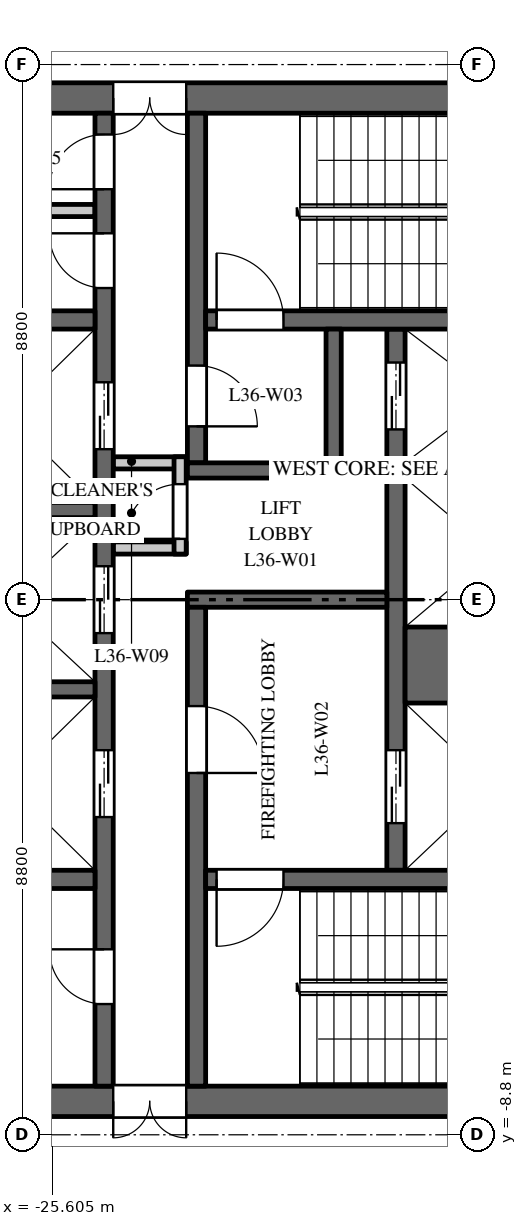
"""IFC4 building model, lengths in metres.
Left out: names, types, materials, properties, quantities, classifications, styles, units other than length and angle.
Written with IfcOpenShell. Run it as: python <this file> out.ifc"""

import sys

from ifc_helpers import new_model, si_unit, direction, frame, frame_2d, origin, place, context, subcontext, project, spatial, rectangle, extrude, element, fill, save


model = new_model("IFC4")
c1 = context("Model", 3, precision=1e-05, world=origin(), true_north=direction((0.0, 1.0)))
c2 = subcontext(c1, "Body", "Model", "MODEL_VIEW")
j1 = project(units=[si_unit("LENGTHUNIT", "METRE"), si_unit("PLANEANGLEUNIT", "RADIAN")], contexts=[c1])
p1 = place(None, origin())
s1 = spatial("IfcSite", under=j1, at=p1, CompositionType="ELEMENT")
p2 = place(p1, origin())
s2 = spatial("IfcBuilding", under=s1, at=p2, CompositionType="ELEMENT")
p3 = place(p2, frame((0.0, 0.0, 158.0)))
s3 = spatial("IfcBuildingStorey", under=s2, at=p3, CompositionType="ELEMENT", Elevation=158.0)
p4 = place(p3, frame((-16.5, 8.25, 0.0), z_axis=(0.0, 0.0, 1.0), x_axis=(-1.0, 0.0, 0.0)))
e1 = element("IfcWall", 1, at=p4, inside=s3, PredefinedType="SHEAR", context=c2, shape_type="SweptSolid", body=[
    extrude(rectangle(XDim=15.0, YDim=0.5, at=frame_2d((7.5, 0.0))), origin(), (0.0, 0.0, 1.0), 3.7),
])
p5 = place(p4, frame((6.9, 0.0, 0.0)))
e2 = element("IfcOpeningElement", 2, at=p5, cuts=e1, PredefinedType="OPENING", context=c2, shape_type="SweptSolid", body=[
    extrude(rectangle(XDim=1.2, YDim=2.1, at=frame_2d((0.6, 1.05))), frame((0.0, 0.26, 0.0), z_axis=(0.0, -1.0, 0.0), x_axis=(1.0, 0.0, 0.0)), (0.0, 0.0, 1.0), 0.52),
])
p6 = place(p4, frame((12.275, 0.0, 0.0)))
e3 = element("IfcOpeningElement", 3, at=p6, cuts=e1, PredefinedType="OPENING", context=c2, shape_type="SweptSolid", body=[
    extrude(rectangle(XDim=0.9, YDim=2.1, at=frame_2d((0.45, 1.05))), frame((0.0, 0.26, 0.0), z_axis=(0.0, -1.0, 0.0), x_axis=(1.0, 0.0, 0.0)), (0.0, 0.0, 1.0), 0.52),
])
p7 = place(p3, frame((-16.5, -8.25, 0.0), z_axis=(0.0, 0.0, 1.0), x_axis=(-1.0, 0.0, 0.0)))
e4 = element("IfcWall", 4, at=p7, inside=s3, PredefinedType="SHEAR", context=c2, shape_type="SweptSolid", body=[
    extrude(rectangle(XDim=15.0, YDim=0.5, at=frame_2d((7.5, 0.0))), origin(), (0.0, 0.0, 1.0), 3.7),
])
p8 = place(p7, frame((6.9, 0.0, 0.0)))
e5 = element("IfcOpeningElement", 5, at=p8, cuts=e4, PredefinedType="OPENING", context=c2, shape_type="SweptSolid", body=[
    extrude(rectangle(XDim=1.2, YDim=2.1, at=frame_2d((0.6, 1.05))), frame((0.0, 0.26, 0.0), z_axis=(0.0, -1.0, 0.0), x_axis=(1.0, 0.0, 0.0)), (0.0, 0.0, 1.0), 0.52),
])
p9 = place(p7, frame((12.425, 0.0, 0.0)))
e6 = element("IfcOpeningElement", 6, at=p9, cuts=e4, PredefinedType="OPENING", context=c2, shape_type="SweptSolid", body=[
    extrude(rectangle(XDim=0.9, YDim=2.1, at=frame_2d((0.45, 1.05))), frame((0.0, 0.26, 0.0), z_axis=(0.0, -1.0, 0.0), x_axis=(1.0, 0.0, 0.0)), (0.0, 0.0, 1.0), 0.52),
])
p10 = place(p3, frame((-19.95, -4.45, 0.0), z_axis=(0.0, 0.0, 1.0), x_axis=(0.0, 1.0, 0.0)))
e7 = element("IfcWall", 7, at=p10, inside=s3, PredefinedType="SHEAR", context=c2, shape_type="SweptSolid", body=[
    extrude(rectangle(XDim=8.9, YDim=0.3, at=frame_2d((4.45, 0.0))), origin(), (0.0, 0.0, 1.0), 3.7),
])
p11 = place(p10, frame((0.775, 0.0, 0.0)))
e8 = element("IfcOpeningElement", 8, at=p11, cuts=e7, PredefinedType="OPENING", context=c2, shape_type="SweptSolid", body=[
    extrude(rectangle(XDim=1.2, YDim=2.1, at=frame_2d((0.6, 1.05))), frame((0.0, 0.16, 0.0), z_axis=(0.0, -1.0, 0.0), x_axis=(1.0, 0.0, 0.0)), (0.0, 0.0, 1.0), 0.32),
])
p12 = place(p10, frame((7.25, 0.0, 0.0)))
e9 = element("IfcOpeningElement", 9, at=p12, cuts=e7, PredefinedType="OPENING", context=c2, shape_type="SweptSolid", body=[
    extrude(rectangle(XDim=1.1, YDim=2.1, at=frame_2d((0.55, 1.05))), frame((0.0, 0.16, 0.0), z_axis=(0.0, -1.0, 0.0), x_axis=(1.0, 0.0, 0.0)), (0.0, 0.0, 1.0), 0.32),
])
p13 = place(p3, frame((-24.75, -8.0, 0.0), z_axis=(0.0, 0.0, 1.0), x_axis=(0.0, 1.0, 0.0)))
e10 = element("IfcWall", 10, at=p13, inside=s3, PredefinedType="SHEAR", context=c2, shape_type="SweptSolid", body=[
    extrude(rectangle(XDim=16.0, YDim=0.3, at=frame_2d((8.0, 0.0))), origin(), (0.0, 0.0, 1.0), 3.7),
])
p14 = place(p13, frame((4.425, 0.0, 0.0)))
e11 = element("IfcOpeningElement", 11, at=p14, cuts=e10, PredefinedType="OPENING", context=c2, shape_type="SweptSolid", body=[
    extrude(rectangle(XDim=1.1, YDim=2.1, at=frame_2d((0.55, 1.05))), frame((0.0, 0.16, 0.0), z_axis=(0.0, -1.0, 0.0), x_axis=(1.0, 0.0, 0.0)), (0.0, 0.0, 1.0), 0.32),
])
p15 = place(p13, frame((7.45, 0.0, 0.0)))
e12 = element("IfcOpeningElement", 12, at=p15, cuts=e10, PredefinedType="OPENING", context=c2, shape_type="SweptSolid", body=[
    extrude(rectangle(XDim=1.1, YDim=2.1, at=frame_2d((0.55, 1.05))), frame((0.0, 0.16, 0.0), z_axis=(0.0, -1.0, 0.0), x_axis=(1.0, 0.0, 0.0)), (0.0, 0.0, 1.0), 0.32),
])
p16 = place(p13, frame((10.475, 0.0, 0.0)))
e13 = element("IfcOpeningElement", 13, at=p16, cuts=e10, PredefinedType="OPENING", context=c2, shape_type="SweptSolid", body=[
    extrude(rectangle(XDim=1.1, YDim=2.1, at=frame_2d((0.55, 1.05))), frame((0.0, 0.16, 0.0), z_axis=(0.0, -1.0, 0.0), x_axis=(1.0, 0.0, 0.0)), (0.0, 0.0, 1.0), 0.32),
])
p17 = place(p13, frame((13.125, 0.0, 0.0)))
e14 = element("IfcOpeningElement", 14, at=p17, cuts=e10, PredefinedType="OPENING", context=c2, shape_type="SweptSolid", body=[
    extrude(rectangle(XDim=0.9, YDim=2.1, at=frame_2d((0.45, 1.05))), frame((0.0, 0.16, 0.0), z_axis=(0.0, -1.0, 0.0), x_axis=(1.0, 0.0, 0.0)), (0.0, 0.0, 1.0), 0.32),
])
p18 = place(p13, frame((14.75, 0.0, 0.0)))
e15 = element("IfcOpeningElement", 15, at=p18, cuts=e10, PredefinedType="OPENING", context=c2, shape_type="SweptSolid", body=[
    extrude(rectangle(XDim=0.9, YDim=2.1, at=frame_2d((0.45, 1.05))), frame((0.0, 0.16, 0.0), z_axis=(0.0, -1.0, 0.0), x_axis=(1.0, 0.0, 0.0)), (0.0, 0.0, 1.0), 0.32),
])
p19 = place(p13, frame((1.35, 0.0, 0.0)))
e16 = element("IfcOpeningElement", 16, at=p19, cuts=e10, PredefinedType="OPENING", context=c2, shape_type="SweptSolid", body=[
    extrude(rectangle(XDim=0.9, YDim=2.1, at=frame_2d((0.45, 1.05))), frame((0.0, 0.16, 0.0), z_axis=(0.0, -1.0, 0.0), x_axis=(1.0, 0.0, 0.0)), (0.0, 0.0, 1.0), 0.32),
])
p20 = place(p3, frame((-20.1, 0.0, 0.0), z_axis=(0.0, 0.0, 1.0), x_axis=(-1.0, 0.0, 0.0)))
e17 = element("IfcWall", 17, at=p20, inside=s3, PredefinedType="SHEAR", context=c2, shape_type="SweptSolid", body=[
    extrude(rectangle(XDim=3.28, YDim=0.25, at=frame_2d((1.64, 0.0))), origin(), (0.0, 0.0, 1.0), 3.7),
])
for number, where, z_axis, x_axis in (
    (18, (-23.4, 0.85, 0.0), (0.0, 0.0, 1.0), (-1.0, 0.0, 0.0)),
    (19, (-23.4, 2.25, 0.0), (0.0, 0.0, 1.0), (-1.0, 0.0, 0.0)),
):
    element("IfcWall", number, at=place(p3, frame(where, z_axis=z_axis, x_axis=x_axis)), inside=s3, PredefinedType="PARTITIONING", context=c2, shape_type="SweptSolid", body=[
        extrude(rectangle(XDim=1.2, YDim=0.2, at=frame_2d((0.6, 0.0))), origin(), (0.0, 0.0, 1.0), 3.7),
    ])
p21 = place(p3, frame((-23.5, 0.75, 0.0), z_axis=(0.0, 0.0, 1.0), x_axis=(0.0, 1.0, 0.0)))
e20 = element("IfcWall", 20, at=p21, inside=s3, PredefinedType="PARTITIONING", context=c2, shape_type="SweptSolid", body=[
    extrude(rectangle(XDim=1.6, YDim=0.2, at=frame_2d((0.8, 0.0))), origin(), (0.0, 0.0, 1.0), 3.7),
])
p22 = place(p21, frame((0.25, 0.0, 0.0)))
e21 = element("IfcOpeningElement", 21, at=p22, cuts=e20, PredefinedType="OPENING", context=c2, shape_type="SweptSolid", body=[
    extrude(rectangle(XDim=0.9, YDim=2.1, at=frame_2d((0.45, 1.05))), frame((0.0, 0.11, 0.0), z_axis=(0.0, -1.0, 0.0), x_axis=(1.0, 0.0, 0.0)), (0.0, 0.0, 1.0), 0.22),
])
p23 = place(p3, frame((-24.9, 4.6, 0.0), z_axis=(0.0, 0.0, 1.0), x_axis=(-1.0, 0.0, 0.0)))
e22 = element("IfcWall", 22, at=p23, inside=s3, PredefinedType="SHEAR", context=c2, shape_type="SweptSolid", body=[
    extrude(rectangle(XDim=6.1, YDim=0.3, at=frame_2d((3.05, 0.0))), origin(), (0.0, 0.0, 1.0), 3.7),
])
p24 = place(p23, frame((4.2, 0.0, 0.0)))
e23 = element("IfcOpeningElement", 23, at=p24, cuts=e22, PredefinedType="OPENING", context=c2, shape_type="SweptSolid", body=[
    extrude(rectangle(XDim=0.9, YDim=2.1, at=frame_2d((0.45, 1.05))), frame((0.0, 0.16, 0.0), z_axis=(0.0, -1.0, 0.0), x_axis=(1.0, 0.0, 0.0)), (0.0, 0.0, 1.0), 0.32),
])
p25 = place(p3, frame((-24.9, 6.4, 0.0), z_axis=(0.0, 0.0, 1.0), x_axis=(-1.0, 0.0, 0.0)))
e24 = element("IfcWall", 24, at=p25, inside=s3, PredefinedType="PARTITIONING", context=c2, shape_type="SweptSolid", body=[
    extrude(rectangle(XDim=2.35, YDim=0.2, at=frame_2d((1.175, 0.0))), origin(), (0.0, 0.0, 1.0), 3.7),
])
p26 = place(p3, frame((-24.9, -4.6, 0.0), z_axis=(0.0, 0.0, 1.0), x_axis=(-1.0, 0.0, 0.0)))
e25 = element("IfcWall", 25, at=p26, inside=s3, PredefinedType="SHEAR", context=c2, shape_type="SweptSolid", body=[
    extrude(rectangle(XDim=6.1, YDim=0.3, at=frame_2d((3.05, 0.0))), origin(), (0.0, 0.0, 1.0), 3.7),
])
p27 = place(p3, frame((-16.9, -1.075, 0.0), z_axis=(0.0, 0.0, 1.0), x_axis=(-1.0, 0.0, 0.0)))
e26 = element("IfcWall", 26, at=p27, inside=s3, PredefinedType="SHEAR", context=c2, shape_type="SweptSolid", body=[
    extrude(rectangle(XDim=2.9, YDim=1.25, at=frame_2d((1.45, 0.0))), origin(), (0.0, 0.0, 1.0), 3.7),
])
for number, where, z_axis, x_axis in (
    (27, (-16.9, 2.125, 0.0), (0.0, 0.0, 1.0), (-1.0, 0.0, 0.0)),
    (28, (-24.9, -1.475, 0.0), (0.0, 0.0, 1.0), (-1.0, 0.0, 0.0)),
    (29, (-24.9, 1.475, 0.0), (0.0, 0.0, 1.0), (-1.0, 0.0, 0.0)),
):
    element("IfcWall", number, at=place(p3, frame(where, z_axis=z_axis, x_axis=x_axis)), inside=s3, PredefinedType="SHEAR", context=c2, shape_type="SweptSolid", body=[
        extrude(rectangle(XDim=2.9, YDim=0.25, at=frame_2d((1.45, 0.0))), origin(), (0.0, 0.0, 1.0), 3.7),
    ])
p28 = place(p3, frame((-23.23, 2.25, 0.0), z_axis=(0.0, 0.0, 1.0), x_axis=(0.0, 1.0, 0.0)))
e30 = element("IfcWall", 30, at=p28, inside=s3, PredefinedType="SHEAR", context=c2, shape_type="SweptSolid", body=[
    extrude(rectangle(XDim=5.75, YDim=0.3, at=frame_2d((2.875, 0.0))), origin(), (0.0, 0.0, 1.0), 3.7),
])
p29 = place(p28, frame((0.6, 0.0, 0.0)))
e31 = element("IfcOpeningElement", 31, at=p29, cuts=e30, PredefinedType="OPENING", context=c2, shape_type="SweptSolid", body=[
    extrude(rectangle(XDim=1.0, YDim=2.1, at=frame_2d((0.5, 1.05))), frame((0.0, 0.16, 0.0), z_axis=(0.0, -1.0, 0.0), x_axis=(1.0, 0.0, 0.0)), (0.0, 0.0, 1.0), 0.32),
])
p30 = place(p3, frame((-23.23, -8.0, 0.0), z_axis=(0.0, 0.0, 1.0), x_axis=(0.0, 1.0, 0.0)))
e32 = element("IfcWall", 32, at=p30, inside=s3, PredefinedType="SHEAR", context=c2, shape_type="SweptSolid", body=[
    extrude(rectangle(XDim=7.875, YDim=0.3, at=frame_2d((3.938, 0.0))), origin(), (0.0, 0.0, 1.0), 3.7),
])
p31 = place(p30, frame((5.15, 0.0, 0.0)))
e33 = element("IfcOpeningElement", 33, at=p31, cuts=e32, PredefinedType="OPENING", context=c2, shape_type="SweptSolid", body=[
    extrude(rectangle(XDim=1.1, YDim=2.1, at=frame_2d((0.55, 1.05))), frame((0.0, 0.16, 0.0), z_axis=(0.0, -1.0, 0.0), x_axis=(1.0, 0.0, 0.0)), (0.0, 0.0, 1.0), 0.32),
])
p32 = place(p3, frame((-16.9, 4.6, 0.0), z_axis=(0.0, 0.0, 1.0), x_axis=(-1.0, 0.0, 0.0)))
e34 = element("IfcWall", 34, at=p32, inside=s3, PredefinedType="SHEAR", context=c2, shape_type="SweptSolid", body=[
    extrude(rectangle(XDim=6.18, YDim=0.3, at=frame_2d((3.09, 0.0))), origin(), (0.0, 0.0, 1.0), 3.7),
])
p33 = place(p32, frame((4.9, 0.0, 0.0)))
e35 = element("IfcOpeningElement", 35, at=p33, cuts=e34, PredefinedType="OPENING", context=c2, shape_type="SweptSolid", body=[
    extrude(rectangle(XDim=1.1, YDim=2.1, at=frame_2d((0.55, 1.05))), frame((0.0, 0.16, 0.0), z_axis=(0.0, -1.0, 0.0), x_axis=(1.0, 0.0, 0.0)), (0.0, 0.0, 1.0), 0.32),
])
p34 = place(p3, frame((-16.9, -4.6, 0.0), z_axis=(0.0, 0.0, 1.0), x_axis=(-1.0, 0.0, 0.0)))
e36 = element("IfcWall", 36, at=p34, inside=s3, PredefinedType="SHEAR", context=c2, shape_type="SweptSolid", body=[
    extrude(rectangle(XDim=6.18, YDim=0.3, at=frame_2d((3.09, 0.0))), origin(), (0.0, 0.0, 1.0), 3.7),
])
p35 = place(p34, frame((4.9, 0.0, 0.0)))
e37 = element("IfcOpeningElement", 37, at=p35, cuts=e36, PredefinedType="OPENING", context=c2, shape_type="SweptSolid", body=[
    extrude(rectangle(XDim=1.1, YDim=2.1, at=frame_2d((0.55, 1.05))), frame((0.0, 0.16, 0.0), z_axis=(0.0, -1.0, 0.0), x_axis=(1.0, 0.0, 0.0)), (0.0, 0.0, 1.0), 0.32),
])
p36 = place(p3, frame((-20.85, 2.125, 0.0), z_axis=(0.0, 0.0, 1.0), x_axis=(-1.0, 0.0, 0.0)))
e38 = element("IfcWall", 38, at=p36, inside=s3, PredefinedType="SHEAR", context=c2, shape_type="SweptSolid", body=[
    extrude(rectangle(XDim=2.53, YDim=0.25, at=frame_2d((1.265, 0.0))), origin(), (0.0, 0.0, 1.0), 3.7),
])
p37 = place(p3, frame((-20.975, 2.25, 0.0), z_axis=(0.0, 0.0, 1.0), x_axis=(0.0, 1.0, 0.0)))
e39 = element("IfcWall", 39, at=p37, inside=s3, PredefinedType="SHEAR", context=c2, shape_type="SweptSolid", body=[
    extrude(rectangle(XDim=2.2, YDim=0.25, at=frame_2d((1.1, 0.0))), origin(), (0.0, 0.0, 1.0), 3.7),
])
p38 = place(p11, origin())
e40 = element("IfcDoor", 40, at=p38, inside=s3, OperationType="DOUBLE_DOOR_SLIDING", PredefinedType="DOOR", context=c2, shape_type="SweptSolid", body=[
    extrude(rectangle(XDim=1.2, YDim=2.1, at=frame_2d((0.6, 1.05))), frame((0.0, 0.025, 0.0), z_axis=(0.0, -1.0, 0.0), x_axis=(1.0, 0.0, 0.0)), (0.0, 0.0, 1.0), 0.05),
])
fill(e8, e40)
p39 = place(p12, origin())
e41 = element("IfcDoor", 41, at=p39, inside=s3, OperationType="DOUBLE_DOOR_SLIDING", PredefinedType="DOOR", context=c2, shape_type="SweptSolid", body=[
    extrude(rectangle(XDim=1.1, YDim=2.1, at=frame_2d((0.55, 1.05))), frame((0.0, 0.025, 0.0), z_axis=(0.0, -1.0, 0.0), x_axis=(1.0, 0.0, 0.0)), (0.0, 0.0, 1.0), 0.05),
])
fill(e9, e41)
p40 = place(p14, origin())
e42 = element("IfcDoor", 42, at=p40, inside=s3, OperationType="DOUBLE_DOOR_SLIDING", PredefinedType="DOOR", context=c2, shape_type="SweptSolid", body=[
    extrude(rectangle(XDim=1.1, YDim=2.1, at=frame_2d((0.55, 1.05))), frame((0.0, 0.025, 0.0), z_axis=(0.0, -1.0, 0.0), x_axis=(1.0, 0.0, 0.0)), (0.0, 0.0, 1.0), 0.05),
])
fill(e11, e42)
p41 = place(p15, origin())
e43 = element("IfcDoor", 43, at=p41, inside=s3, OperationType="DOUBLE_DOOR_SLIDING", PredefinedType="DOOR", context=c2, shape_type="SweptSolid", body=[
    extrude(rectangle(XDim=1.1, YDim=2.1, at=frame_2d((0.55, 1.05))), frame((0.0, 0.025, 0.0), z_axis=(0.0, -1.0, 0.0), x_axis=(1.0, 0.0, 0.0)), (0.0, 0.0, 1.0), 0.05),
])
fill(e12, e43)
p42 = place(p16, origin())
e44 = element("IfcDoor", 44, at=p42, inside=s3, OperationType="DOUBLE_DOOR_SLIDING", PredefinedType="DOOR", context=c2, shape_type="SweptSolid", body=[
    extrude(rectangle(XDim=1.1, YDim=2.1, at=frame_2d((0.55, 1.05))), frame((0.0, 0.025, 0.0), z_axis=(0.0, -1.0, 0.0), x_axis=(1.0, 0.0, 0.0)), (0.0, 0.0, 1.0), 0.05),
])
fill(e13, e44)
p43 = place(p33, origin())
e45 = element("IfcDoor", 45, at=p43, inside=s3, OperationType="SINGLE_SWING_RIGHT", PredefinedType="DOOR", context=c2, shape_type="SweptSolid", body=[
    extrude(rectangle(XDim=1.1, YDim=2.1, at=frame_2d((0.55, 1.05))), frame((0.0, 0.025, 0.0), z_axis=(0.0, -1.0, 0.0), x_axis=(1.0, 0.0, 0.0)), (0.0, 0.0, 1.0), 0.05),
])
fill(e35, e45)
p44 = place(p35, origin())
e46 = element("IfcDoor", 46, at=p44, inside=s3, OperationType="SINGLE_SWING_LEFT", PredefinedType="DOOR", context=c2, shape_type="SweptSolid", body=[
    extrude(rectangle(XDim=1.1, YDim=2.1, at=frame_2d((0.55, 1.05))), frame((0.0, 0.025, 0.0), z_axis=(0.0, -1.0, 0.0), x_axis=(1.0, 0.0, 0.0)), (0.0, 0.0, 1.0), 0.05),
])
fill(e37, e46)
p45 = place(p31, origin())
e47 = element("IfcDoor", 47, at=p45, inside=s3, OperationType="SINGLE_SWING_LEFT", PredefinedType="DOOR", context=c2, shape_type="SweptSolid", body=[
    extrude(rectangle(XDim=1.1, YDim=2.1, at=frame_2d((0.55, 1.05))), frame((0.0, 0.025, 0.0), z_axis=(0.0, -1.0, 0.0), x_axis=(1.0, 0.0, 0.0)), (0.0, 0.0, 1.0), 0.05),
])
fill(e33, e47)
p46 = place(p29, origin())
e48 = element("IfcDoor", 48, at=p46, inside=s3, OperationType="SINGLE_SWING_LEFT", PredefinedType="DOOR", context=c2, shape_type="SweptSolid", body=[
    extrude(rectangle(XDim=1.0, YDim=2.1, at=frame_2d((0.5, 1.05))), frame((0.0, 0.025, 0.0), z_axis=(0.0, -1.0, 0.0), x_axis=(1.0, 0.0, 0.0)), (0.0, 0.0, 1.0), 0.05),
])
fill(e31, e48)
p47 = place(p5, origin())
e49 = element("IfcDoor", 49, at=p47, inside=s3, OperationType="DOUBLE_DOOR_DOUBLE_SWING", PredefinedType="DOOR", context=c2, shape_type="SweptSolid", body=[
    extrude(rectangle(XDim=1.2, YDim=2.1, at=frame_2d((0.6, 1.05))), frame((0.0, 0.025, 0.0), z_axis=(0.0, -1.0, 0.0), x_axis=(1.0, 0.0, 0.0)), (0.0, 0.0, 1.0), 0.05),
])
fill(e2, e49)
p48 = place(p8, origin())
e50 = element("IfcDoor", 50, at=p48, inside=s3, OperationType="DOUBLE_DOOR_DOUBLE_SWING", PredefinedType="DOOR", context=c2, shape_type="SweptSolid", body=[
    extrude(rectangle(XDim=1.2, YDim=2.1, at=frame_2d((0.6, 1.05))), frame((0.0, 0.025, 0.0), z_axis=(0.0, -1.0, 0.0), x_axis=(1.0, 0.0, 0.0)), (0.0, 0.0, 1.0), 0.05),
])
fill(e5, e50)
p49 = place(p17, origin())
e51 = element("IfcDoor", 51, at=p49, inside=s3, OperationType="SINGLE_SWING_LEFT", PredefinedType="DOOR", context=c2, shape_type="SweptSolid", body=[
    extrude(rectangle(XDim=0.9, YDim=2.1, at=frame_2d((0.45, 1.05))), frame((0.0, 0.025, 0.0), z_axis=(0.0, -1.0, 0.0), x_axis=(1.0, 0.0, 0.0)), (0.0, 0.0, 1.0), 0.05),
])
fill(e14, e51)
p50 = place(p18, origin())
e52 = element("IfcDoor", 52, at=p50, inside=s3, OperationType="SINGLE_SWING_RIGHT", PredefinedType="DOOR", context=c2, shape_type="SweptSolid", body=[
    extrude(rectangle(XDim=0.9, YDim=2.1, at=frame_2d((0.45, 1.05))), frame((0.0, 0.025, 0.0), z_axis=(0.0, -1.0, 0.0), x_axis=(1.0, 0.0, 0.0)), (0.0, 0.0, 1.0), 0.05),
])
fill(e15, e52)
p51 = place(p19, origin())
e53 = element("IfcDoor", 53, at=p51, inside=s3, OperationType="SINGLE_SWING_LEFT", PredefinedType="DOOR", context=c2, shape_type="SweptSolid", body=[
    extrude(rectangle(XDim=0.9, YDim=2.1, at=frame_2d((0.45, 1.05))), frame((0.0, 0.025, 0.0), z_axis=(0.0, -1.0, 0.0), x_axis=(1.0, 0.0, 0.0)), (0.0, 0.0, 1.0), 0.05),
])
fill(e16, e53)
p52 = place(p22, origin())
e54 = element("IfcDoor", 54, at=p52, inside=s3, OperationType="SINGLE_SWING_RIGHT", PredefinedType="DOOR", context=c2, shape_type="SweptSolid", body=[
    extrude(rectangle(XDim=0.9, YDim=2.1, at=frame_2d((0.45, 1.05))), frame((0.0, 0.025, 0.0), z_axis=(0.0, -1.0, 0.0), x_axis=(1.0, 0.0, 0.0)), (0.0, 0.0, 1.0), 0.05),
])
fill(e21, e54)
save(model, sys.argv[1])
